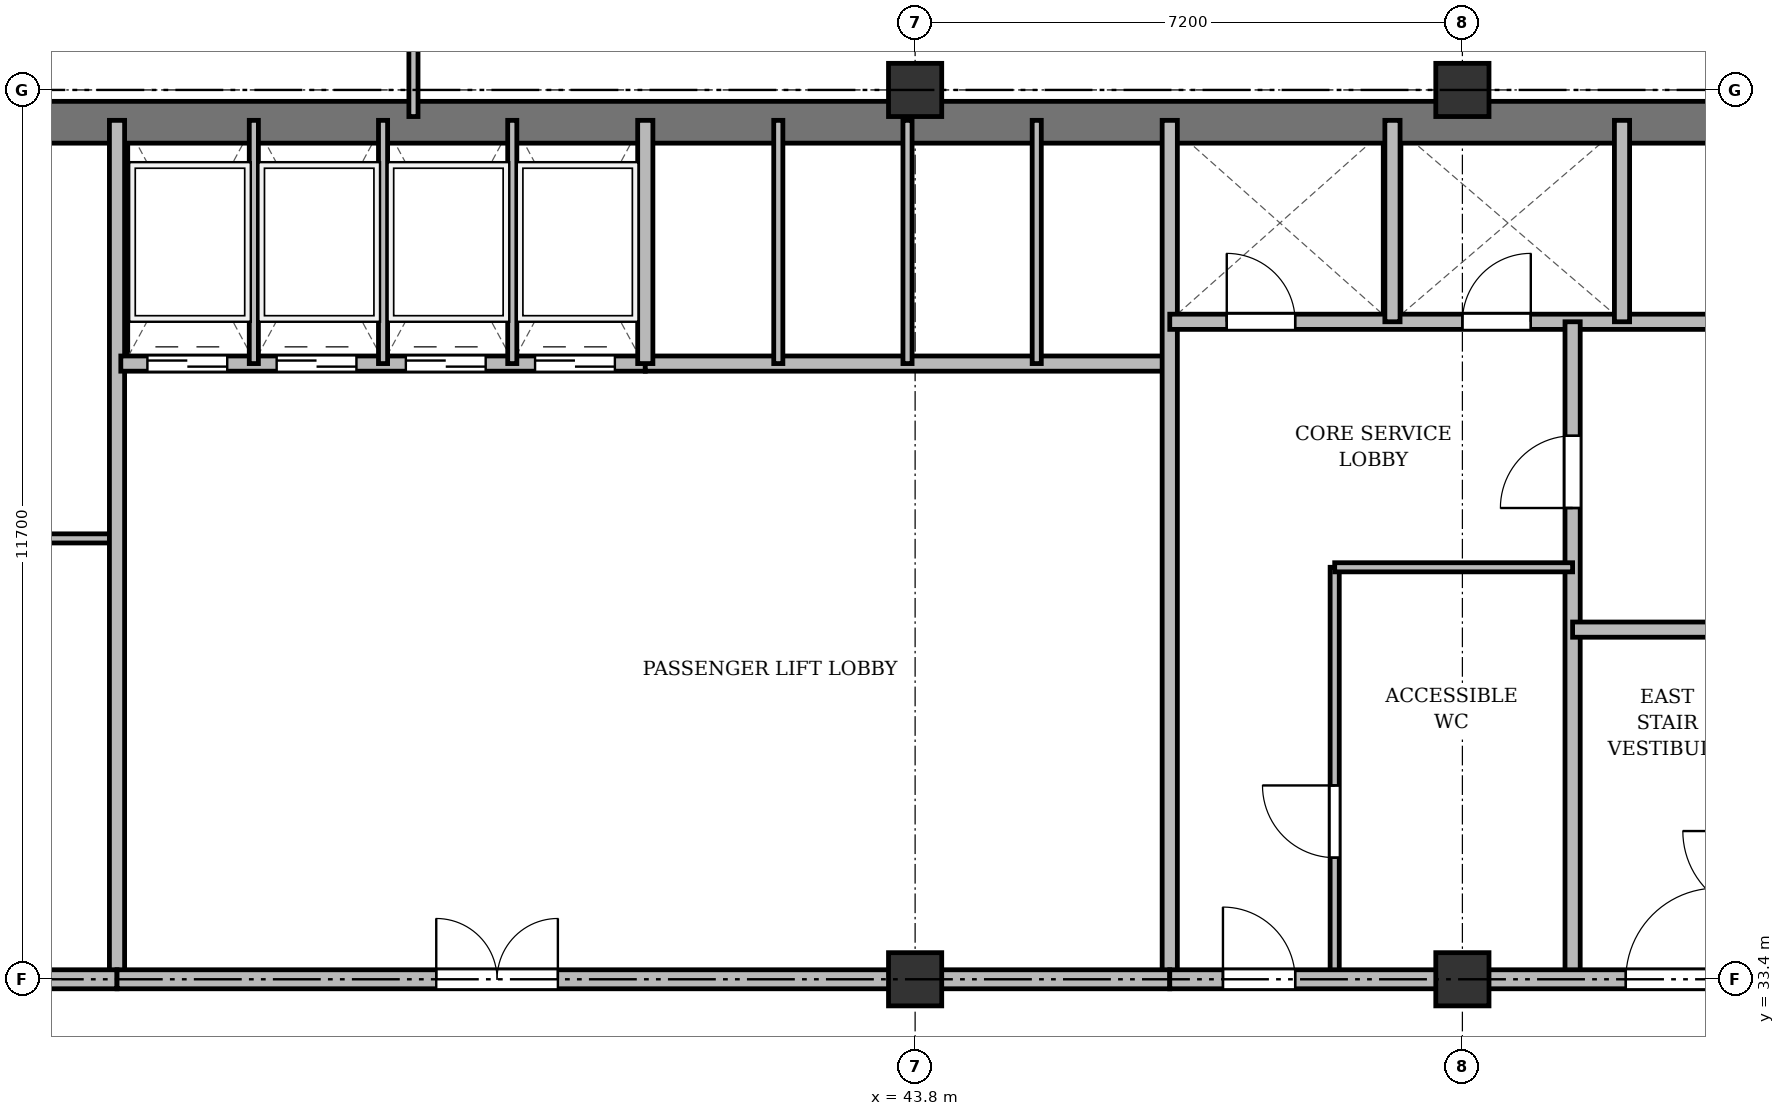
"""IFC4 building model, lengths in metres.
Left out: names, types, materials, properties, quantities, classifications, styles, units other than length and angle.
Written with IfcOpenShell. Run it as: python <this file> out.ifc"""

import sys

from ifc_helpers import new_model, si_unit, direction, frame, frame_2d, origin, origin_2d, place, context, subcontext, project, spatial, rectangle, extrude, source, transform, mapped, element, fill, save


model = new_model("IFC4")
c1 = context("Model", 3, precision=1e-05, world=origin(), true_north=direction((0.0, 1.0)))
c2 = subcontext(c1, "Body", "Model", "MODEL_VIEW")
j1 = project(units=[si_unit("LENGTHUNIT", "METRE"), si_unit("PLANEANGLEUNIT", "RADIAN")], contexts=[c1])
p1 = place(None, origin())
s1 = spatial("IfcSite", under=j1, at=p1, CompositionType="ELEMENT")
p2 = place(p1, origin())
s2 = spatial("IfcBuilding", under=s1, at=p2, CompositionType="ELEMENT")
p3 = place(p2, frame((0.0, 0.0, 150.1)))
s3 = spatial("IfcBuildingStorey", under=s2, at=p3, CompositionType="ELEMENT", Elevation=150.1)
m1 = source(origin(), c2, "Body", "SweptSolid", [
    extrude(rectangle(XDim=0.7, YDim=0.7, at=origin_2d()), origin(), (0.0, 0.0, 1.0), 3.6),
])
for number, where, z_axis, x_axis in (
    (1, (43.8, 33.4, 0.0), (0.0, 0.0, 1.0), (1.0, 0.0, 0.0)),
    (2, (43.8, 45.1, 0.0), (0.0, 0.0, 1.0), (1.0, 0.0, 0.0)),
    (3, (51.0, 33.4, 0.0), (0.0, 0.0, 1.0), (1.0, 0.0, 0.0)),
    (4, (51.0, 45.1, 0.0), (0.0, 0.0, 1.0), (1.0, 0.0, 0.0)),
):
    element("IfcColumn", number, at=place(p3, frame(where, z_axis=z_axis, x_axis=x_axis)), inside=s3, PredefinedType="COLUMN", context=c2, shape_type="MappedRepresentation", body=[
        mapped(m1, transform((0.0, 0.0, 0.0), x_axis=(1.0, 0.0, 0.0), y_axis=(0.0, 1.0, 0.0), z_axis=(0.0, 0.0, 1.0), scale=1.0)),
    ])
p4 = place(p3, frame((15.65, 44.675, 0.0), z_axis=(0.0, 0.0, 1.0), x_axis=(1.0, 0.0, 0.0)))
e5 = element("IfcWall", 5, at=p4, inside=s3, PredefinedType="SHEAR", context=c2, shape_type="SweptSolid", body=[
    extrude(rectangle(XDim=43.1, YDim=0.55, at=frame_2d((21.55, 0.0))), origin(), (0.0, 0.0, 1.0), 3.35),
])
p5 = place(p3, frame((26.3, 39.2, 0.0), z_axis=(0.0, 0.0, 1.0), x_axis=(1.0, 0.0, 0.0)))
e6 = element("IfcWall", 6, at=p5, inside=s3, PredefinedType="PARTITIONING", context=c2, shape_type="SweptSolid", body=[
    extrude(rectangle(XDim=7.0, YDim=0.12, at=frame_2d((3.5, 0.0))), origin(), (0.0, 0.0, 1.0), 2.85),
])
p6 = place(p5, frame((2.6, 0.0, 0.0)))
e7 = element("IfcOpeningElement", 7, at=p6, cuts=e6, PredefinedType="OPENING", context=c2, shape_type="SweptSolid", body=[
    extrude(rectangle(XDim=0.95, YDim=2.15, at=frame_2d((0.475, 1.075))), frame((0.0, 0.07, 0.0), z_axis=(0.0, -1.0, 0.0), x_axis=(1.0, 0.0, 0.0)), (0.0, 0.0, 1.0), 0.14),
])
p7 = place(p3, frame((33.3, 33.4, 0.0), z_axis=(0.0, 0.0, 1.0), x_axis=(0.0, 1.0, 0.0)))
e8 = element("IfcWall", 8, at=p7, inside=s3, PredefinedType="SOLIDWALL", context=c2, shape_type="SweptSolid", body=[
    extrude(rectangle(XDim=11.3, YDim=0.2, at=frame_2d((5.65, 0.0))), origin(), (0.0, 0.0, 1.0), 2.75),
])
p8 = place(p3, frame((33.35, 41.5, 0.0), z_axis=(0.0, 0.0, 1.0), x_axis=(1.0, 0.0, 0.0)))
e9 = element("IfcWall", 9, at=p8, inside=s3, PredefinedType="SOLIDWALL", context=c2, shape_type="SweptSolid", body=[
    extrude(rectangle(XDim=6.9, YDim=0.2, at=frame_2d((3.45, 0.0))), origin(), (0.0, 0.0, 1.0), 3.35),
])
p9 = place(p8, frame((0.35, 0.0, 0.0)))
e10 = element("IfcOpeningElement", 10, at=p9, cuts=e9, PredefinedType="OPENING", context=c2, shape_type="SweptSolid", body=[
    extrude(rectangle(XDim=1.05, YDim=2.15, at=frame_2d((0.525, 1.075))), frame((0.0, 0.11, 0.0), z_axis=(0.0, -1.0, 0.0), x_axis=(1.0, 0.0, 0.0)), (0.0, 0.0, 1.0), 0.22),
])
p10 = place(p8, frame((2.05, 0.0, 0.0)))
e11 = element("IfcOpeningElement", 11, at=p10, cuts=e9, PredefinedType="OPENING", context=c2, shape_type="SweptSolid", body=[
    extrude(rectangle(XDim=1.05, YDim=2.15, at=frame_2d((0.525, 1.075))), frame((0.0, 0.11, 0.0), z_axis=(0.0, -1.0, 0.0), x_axis=(1.0, 0.0, 0.0)), (0.0, 0.0, 1.0), 0.22),
])
p11 = place(p8, frame((3.75, 0.0, 0.0)))
e12 = element("IfcOpeningElement", 12, at=p11, cuts=e9, PredefinedType="OPENING", context=c2, shape_type="SweptSolid", body=[
    extrude(rectangle(XDim=1.05, YDim=2.15, at=frame_2d((0.525, 1.075))), frame((0.0, 0.11, 0.0), z_axis=(0.0, -1.0, 0.0), x_axis=(1.0, 0.0, 0.0)), (0.0, 0.0, 1.0), 0.22),
])
p12 = place(p8, frame((5.45, 0.0, 0.0)))
e13 = element("IfcOpeningElement", 13, at=p12, cuts=e9, PredefinedType="OPENING", context=c2, shape_type="SweptSolid", body=[
    extrude(rectangle(XDim=1.05, YDim=2.15, at=frame_2d((0.525, 1.075))), frame((0.0, 0.11, 0.0), z_axis=(0.0, -1.0, 0.0), x_axis=(1.0, 0.0, 0.0)), (0.0, 0.0, 1.0), 0.22),
])
for number, where, z_axis, x_axis in (
    (14, (35.1, 41.5, 0.0), (0.0, 0.0, 1.0), (0.0, 1.0, 0.0)),
    (15, (36.8, 41.5, 0.0), (0.0, 0.0, 1.0), (0.0, 1.0, 0.0)),
    (16, (38.5, 41.5, 0.0), (0.0, 0.0, 1.0), (0.0, 1.0, 0.0)),
):
    element("IfcWall", number, at=place(p3, frame(where, z_axis=z_axis, x_axis=x_axis)), inside=s3, PredefinedType="PARTITIONING", context=c2, shape_type="SweptSolid", body=[
        extrude(rectangle(XDim=3.2, YDim=0.12, at=frame_2d((1.6, 0.0))), origin(), (0.0, 0.0, 1.0), 3.35),
    ])
p13 = place(p3, frame((40.25, 41.5, 0.0), z_axis=(0.0, 0.0, 1.0), x_axis=(1.0, 0.0, 0.0)))
e17 = element("IfcWall", 17, at=p13, inside=s3, PredefinedType="SOLIDWALL", context=c2, shape_type="SweptSolid", body=[
    extrude(rectangle(XDim=6.9, YDim=0.2, at=frame_2d((3.45, 0.0))), origin(), (0.0, 0.0, 1.0), 2.85),
])
p14 = place(p3, frame((40.25, 41.5, 0.0), z_axis=(0.0, 0.0, 1.0), x_axis=(0.0, 1.0, 0.0)))
e18 = element("IfcWall", 18, at=p14, inside=s3, PredefinedType="SOLIDWALL", context=c2, shape_type="SweptSolid", body=[
    extrude(rectangle(XDim=3.2, YDim=0.2, at=frame_2d((1.6, 0.0))), origin(), (0.0, 0.0, 1.0), 3.35),
])
p15 = place(p3, frame((42.0, 41.5, 0.0), z_axis=(0.0, 0.0, 1.0), x_axis=(0.0, 1.0, 0.0)))
e19 = element("IfcWall", 19, at=p15, inside=s3, PredefinedType="PARTITIONING", context=c2, shape_type="SweptSolid", body=[
    extrude(rectangle(XDim=3.2, YDim=0.12, at=frame_2d((1.6, 0.0))), origin(), (0.0, 0.0, 1.0), 3.35),
])
p16 = place(p3, frame((43.7, 41.5, 0.0), z_axis=(0.0, 0.0, 1.0), x_axis=(0.0, 1.0, 0.0)))
e20 = element("IfcWall", 20, at=p16, inside=s3, PredefinedType="PARTITIONING", context=c2, shape_type="SweptSolid", body=[
    extrude(rectangle(XDim=3.2, YDim=0.12, at=frame_2d((1.6, 0.0))), origin(), (0.0, 0.0, 1.0), 2.85),
])
p17 = place(p3, frame((45.4, 41.5, 0.0), z_axis=(0.0, 0.0, 1.0), x_axis=(0.0, 1.0, 0.0)))
e21 = element("IfcWall", 21, at=p17, inside=s3, PredefinedType="PARTITIONING", context=c2, shape_type="SweptSolid", body=[
    extrude(rectangle(XDim=3.2, YDim=0.12, at=frame_2d((1.6, 0.0))), origin(), (0.0, 0.0, 1.0), 3.35),
])
p18 = place(p3, frame((47.15, 33.4, 0.0), z_axis=(0.0, 0.0, 1.0), x_axis=(0.0, 1.0, 0.0)))
e22 = element("IfcWall", 22, at=p18, inside=s3, PredefinedType="SOLIDWALL", context=c2, shape_type="SweptSolid", body=[
    extrude(rectangle(XDim=11.3, YDim=0.2, at=frame_2d((5.65, 0.0))), origin(), (0.0, 0.0, 1.0), 2.75),
])
p19 = place(p3, frame((26.3, 33.4, 0.0), z_axis=(0.0, 0.0, 1.0), x_axis=(1.0, 0.0, 0.0)))
e23 = element("IfcWall", 23, at=p19, inside=s3, PredefinedType="PARTITIONING", context=c2, shape_type="SweptSolid", body=[
    extrude(rectangle(XDim=7.0, YDim=0.25, at=frame_2d((3.5, 0.0))), origin(), (0.0, 0.0, 1.0), 2.75),
])
p20 = place(p19, frame((1.35, 0.0, 0.0)))
e24 = element("IfcOpeningElement", 24, at=p20, cuts=e23, PredefinedType="OPENING", context=c2, shape_type="SweptSolid", body=[
    extrude(rectangle(XDim=0.95, YDim=2.15, at=frame_2d((0.475, 1.075))), frame((0.0, 0.135, 0.0), z_axis=(0.0, -1.0, 0.0), x_axis=(1.0, 0.0, 0.0)), (0.0, 0.0, 1.0), 0.27),
])
p21 = place(p3, frame((33.3, 33.4, 0.0), z_axis=(0.0, 0.0, 1.0), x_axis=(1.0, 0.0, 0.0)))
e25 = element("IfcWall", 25, at=p21, inside=s3, PredefinedType="PARTITIONING", context=c2, shape_type="SweptSolid", body=[
    extrude(rectangle(XDim=13.85, YDim=0.25, at=frame_2d((6.925, 0.0))), origin(), (0.0, 0.0, 1.0), 2.75),
])
p22 = place(p21, frame((4.2, 0.0, 0.0)))
e26 = element("IfcOpeningElement", 26, at=p22, cuts=e25, PredefinedType="OPENING", context=c2, shape_type="SweptSolid", body=[
    extrude(rectangle(XDim=1.6, YDim=2.2, at=frame_2d((0.8, 1.1))), frame((0.0, 0.135, 0.0), z_axis=(0.0, -1.0, 0.0), x_axis=(1.0, 0.0, 0.0)), (0.0, 0.0, 1.0), 0.27),
])
p23 = place(p3, frame((47.15, 42.05, 0.0), z_axis=(0.0, 0.0, 1.0), x_axis=(1.0, 0.0, 0.0)))
e27 = element("IfcWall", 27, at=p23, inside=s3, PredefinedType="SOLIDWALL", context=c2, shape_type="SweptSolid", body=[
    extrude(rectangle(XDim=7.85, YDim=0.2, at=frame_2d((3.925, 0.0))), origin(), (0.0, 0.0, 1.0), 2.85),
])
p24 = place(p23, frame((0.75, 0.0, 0.0)))
e28 = element("IfcOpeningElement", 28, at=p24, cuts=e27, PredefinedType="OPENING", context=c2, shape_type="SweptSolid", body=[
    extrude(rectangle(XDim=0.9, YDim=2.1, at=frame_2d((0.45, 1.05))), frame((0.0, 0.11, 0.0), z_axis=(0.0, -1.0, 0.0), x_axis=(1.0, 0.0, 0.0)), (0.0, 0.0, 1.0), 0.22),
])
p25 = place(p23, frame((3.85, 0.0, 0.0)))
e29 = element("IfcOpeningElement", 29, at=p25, cuts=e27, PredefinedType="OPENING", context=c2, shape_type="SweptSolid", body=[
    extrude(rectangle(XDim=0.9, YDim=2.1, at=frame_2d((0.45, 1.05))), frame((0.0, 0.11, 0.0), z_axis=(0.0, -1.0, 0.0), x_axis=(1.0, 0.0, 0.0)), (0.0, 0.0, 1.0), 0.22),
])
for number, where, z_axis, x_axis in (
    (30, (50.08, 42.05, 0.0), (0.0, 0.0, 1.0), (0.0, 1.0, 0.0)),
    (31, (53.1, 42.05, 0.0), (0.0, 0.0, 1.0), (0.0, 1.0, 0.0)),
):
    element("IfcWall", number, at=place(p3, frame(where, z_axis=z_axis, x_axis=x_axis)), inside=s3, PredefinedType="SOLIDWALL", context=c2, shape_type="SweptSolid", body=[
        extrude(rectangle(XDim=2.65, YDim=0.2, at=frame_2d((1.325, 0.0))), origin(), (0.0, 0.0, 1.0), 3.35),
    ])
p26 = place(p3, frame((52.45, 33.4, 0.0), z_axis=(0.0, 0.0, 1.0), x_axis=(0.0, 1.0, 0.0)))
e32 = element("IfcWall", 32, at=p26, inside=s3, PredefinedType="PARTITIONING", context=c2, shape_type="SweptSolid", body=[
    extrude(rectangle(XDim=8.65, YDim=0.2, at=frame_2d((4.325, 0.0))), origin(), (0.0, 0.0, 1.0), 2.75),
])
p27 = place(p26, frame((6.2, 0.0, 0.0)))
e33 = element("IfcOpeningElement", 33, at=p27, cuts=e32, PredefinedType="OPENING", context=c2, shape_type="SweptSolid", body=[
    extrude(rectangle(XDim=0.95, YDim=2.15, at=frame_2d((0.475, 1.075))), frame((0.0, 0.11, 0.0), z_axis=(0.0, -1.0, 0.0), x_axis=(1.0, 0.0, 0.0)), (0.0, 0.0, 1.0), 0.22),
])
p28 = place(p3, frame((52.45, 38.0, 0.0), z_axis=(0.0, 0.0, 1.0), x_axis=(1.0, 0.0, 0.0)))
e34 = element("IfcWall", 34, at=p28, inside=s3, PredefinedType="PARTITIONING", context=c2, shape_type="SweptSolid", body=[
    extrude(rectangle(XDim=2.55, YDim=0.2, at=frame_2d((1.275, 0.0))), origin(), (0.0, 0.0, 1.0), 3.35),
])
p29 = place(p3, frame((49.32, 33.4, 0.0), z_axis=(0.0, 0.0, 1.0), x_axis=(0.0, 1.0, 0.0)))
e35 = element("IfcWall", 35, at=p29, inside=s3, PredefinedType="PARTITIONING", context=c2, shape_type="SweptSolid", body=[
    extrude(rectangle(XDim=5.42, YDim=0.12, at=frame_2d((2.71, 0.0))), origin(), (0.0, 0.0, 1.0), 2.75),
])
p30 = place(p29, frame((1.6, 0.0, 0.0)))
e36 = element("IfcOpeningElement", 36, at=p30, cuts=e35, PredefinedType="OPENING", context=c2, shape_type="SweptSolid", body=[
    extrude(rectangle(XDim=0.95, YDim=2.15, at=frame_2d((0.475, 1.075))), frame((0.0, 0.07, 0.0), z_axis=(0.0, -1.0, 0.0), x_axis=(1.0, 0.0, 0.0)), (0.0, 0.0, 1.0), 0.14),
])
p31 = place(p3, frame((49.32, 38.82, 0.0), z_axis=(0.0, 0.0, 1.0), x_axis=(1.0, 0.0, 0.0)))
e37 = element("IfcWall", 37, at=p31, inside=s3, PredefinedType="PARTITIONING", context=c2, shape_type="SweptSolid", body=[
    extrude(rectangle(XDim=3.13, YDim=0.12, at=frame_2d((1.565, 0.0))), origin(), (0.0, 0.0, 1.0), 2.85),
])
p32 = place(p3, frame((47.15, 33.4, 0.0), z_axis=(0.0, 0.0, 1.0), x_axis=(1.0, 0.0, 0.0)))
e38 = element("IfcWall", 38, at=p32, inside=s3, PredefinedType="PARTITIONING", context=c2, shape_type="SweptSolid", body=[
    extrude(rectangle(XDim=11.15, YDim=0.25, at=frame_2d((5.575, 0.0))), origin(), (0.0, 0.0, 1.0), 2.75),
])
p33 = place(p32, frame((0.7, 0.0, 0.0)))
e39 = element("IfcOpeningElement", 39, at=p33, cuts=e38, PredefinedType="OPENING", context=c2, shape_type="SweptSolid", body=[
    extrude(rectangle(XDim=0.95, YDim=2.15, at=frame_2d((0.475, 1.075))), frame((0.0, 0.135, 0.0), z_axis=(0.0, -1.0, 0.0), x_axis=(1.0, 0.0, 0.0)), (0.0, 0.0, 1.0), 0.27),
])
p34 = place(p32, frame((6.0, 0.0, 0.0)))
e40 = element("IfcOpeningElement", 40, at=p34, cuts=e38, PredefinedType="OPENING", context=c2, shape_type="SweptSolid", body=[
    extrude(rectangle(XDim=1.2, YDim=2.15, at=frame_2d((0.6, 1.075))), frame((0.0, 0.135, 0.0), z_axis=(0.0, -1.0, 0.0), x_axis=(1.0, 0.0, 0.0)), (0.0, 0.0, 1.0), 0.27),
])
p35 = place(p3, frame((37.2, 44.75, 0.0), z_axis=(0.0, 0.0, 1.0), x_axis=(0.0, 1.0, 0.0)))
e41 = element("IfcWall", 41, at=p35, inside=s3, PredefinedType="PARTITIONING", context=c2, shape_type="SweptSolid", body=[
    extrude(rectangle(XDim=3.61, YDim=0.12, at=frame_2d((1.805, 0.0))), origin(), (0.0, 0.0, 1.0), 2.75),
])
p36 = place(p35, frame((1.1, 0.0, 0.0)))
e42 = element("IfcOpeningElement", 42, at=p36, cuts=e41, PredefinedType="OPENING", context=c2, shape_type="SweptSolid", body=[
    extrude(rectangle(XDim=0.95, YDim=2.15, at=frame_2d((0.475, 1.075))), frame((0.0, 0.07, 0.0), z_axis=(0.0, -1.0, 0.0), x_axis=(1.0, 0.0, 0.0)), (0.0, 0.0, 1.0), 0.14),
])
m2 = source(origin(), c2, "Body", "SweptSolid", [
    extrude(rectangle(XDim=1.05, YDim=2.15, at=frame_2d((0.525, 1.075))), frame((0.0, 0.025, 0.0), z_axis=(0.0, -1.0, 0.0), x_axis=(1.0, 0.0, 0.0)), (0.0, 0.0, 1.0), 0.05),
])
p37 = place(p9, origin())
e43 = element("IfcDoor", 43, at=p37, inside=s3, OperationType="DOUBLE_DOOR_SLIDING", PredefinedType="DOOR", context=c2, shape_type="MappedRepresentation", body=[
    mapped(m2, transform((0.0, 0.0, 0.0), x_axis=(1.0, 0.0, 0.0), y_axis=(0.0, 1.0, 0.0), z_axis=(0.0, 0.0, 1.0), scale=1.0)),
])
fill(e10, e43)
p38 = place(p10, origin())
e44 = element("IfcDoor", 44, at=p38, inside=s3, OperationType="DOUBLE_DOOR_SLIDING", PredefinedType="DOOR", context=c2, shape_type="MappedRepresentation", body=[
    mapped(m2, transform((0.0, 0.0, 0.0), x_axis=(1.0, 0.0, 0.0), y_axis=(0.0, 1.0, 0.0), z_axis=(0.0, 0.0, 1.0), scale=1.0)),
])
fill(e11, e44)
p39 = place(p11, origin())
e45 = element("IfcDoor", 45, at=p39, inside=s3, OperationType="DOUBLE_DOOR_SLIDING", PredefinedType="DOOR", context=c2, shape_type="MappedRepresentation", body=[
    mapped(m2, transform((0.0, 0.0, 0.0), x_axis=(1.0, 0.0, 0.0), y_axis=(0.0, 1.0, 0.0), z_axis=(0.0, 0.0, 1.0), scale=1.0)),
])
fill(e12, e45)
p40 = place(p12, origin())
e46 = element("IfcDoor", 46, at=p40, inside=s3, OperationType="DOUBLE_DOOR_SLIDING", PredefinedType="DOOR", context=c2, shape_type="MappedRepresentation", body=[
    mapped(m2, transform((0.0, 0.0, 0.0), x_axis=(1.0, 0.0, 0.0), y_axis=(0.0, 1.0, 0.0), z_axis=(0.0, 0.0, 1.0), scale=1.0)),
])
fill(e13, e46)
m3 = source(origin(), c2, "Body", "SweptSolid", [
    extrude(rectangle(XDim=1.6, YDim=2.2, at=frame_2d((0.8, 1.1))), frame((0.0, 0.025, 0.0), z_axis=(0.0, -1.0, 0.0), x_axis=(1.0, 0.0, 0.0)), (0.0, 0.0, 1.0), 0.05),
])
p41 = place(p22, origin())
e47 = element("IfcDoor", 47, at=p41, inside=s3, OperationType="DOUBLE_DOOR_SINGLE_SWING", PredefinedType="DOOR", context=c2, shape_type="MappedRepresentation", body=[
    mapped(m3, transform((0.0, 0.0, 0.0), x_axis=(1.0, 0.0, 0.0), y_axis=(0.0, 1.0, 0.0), z_axis=(0.0, 0.0, 1.0), scale=1.0)),
])
fill(e26, e47)
m4 = source(origin(), c2, "Body", "SweptSolid", [
    extrude(rectangle(XDim=0.9, YDim=2.1, at=frame_2d((0.45, 1.05))), frame((0.0, 0.025, 0.0), z_axis=(0.0, -1.0, 0.0), x_axis=(1.0, 0.0, 0.0)), (0.0, 0.0, 1.0), 0.05),
])
p42 = place(p24, origin())
e48 = element("IfcDoor", 48, at=p42, inside=s3, OperationType="SINGLE_SWING_LEFT", PredefinedType="DOOR", context=c2, shape_type="MappedRepresentation", body=[
    mapped(m4, transform((0.0, 0.0, 0.0), x_axis=(1.0, 0.0, 0.0), y_axis=(0.0, 1.0, 0.0), z_axis=(0.0, 0.0, 1.0), scale=1.0)),
])
fill(e28, e48)
p43 = place(p25, origin())
e49 = element("IfcDoor", 49, at=p43, inside=s3, OperationType="SINGLE_SWING_RIGHT", PredefinedType="DOOR", context=c2, shape_type="MappedRepresentation", body=[
    mapped(m4, transform((0.0, 0.0, 0.0), x_axis=(1.0, 0.0, 0.0), y_axis=(0.0, 1.0, 0.0), z_axis=(0.0, 0.0, 1.0), scale=1.0)),
])
fill(e29, e49)
m5 = source(origin(), c2, "Body", "SweptSolid", [
    extrude(rectangle(XDim=0.95, YDim=2.15, at=frame_2d((0.475, 1.075))), frame((0.0, 0.025, 0.0), z_axis=(0.0, -1.0, 0.0), x_axis=(1.0, 0.0, 0.0)), (0.0, 0.0, 1.0), 0.05),
])
p44 = place(p27, origin())
e50 = element("IfcDoor", 50, at=p44, inside=s3, OperationType="SINGLE_SWING_LEFT", PredefinedType="DOOR", context=c2, shape_type="MappedRepresentation", body=[
    mapped(m5, transform((0.0, 0.0, 0.0), x_axis=(1.0, 0.0, 0.0), y_axis=(0.0, 1.0, 0.0), z_axis=(0.0, 0.0, 1.0), scale=1.0)),
])
fill(e33, e50)
p45 = place(p30, origin())
e51 = element("IfcDoor", 51, at=p45, inside=s3, OperationType="SINGLE_SWING_RIGHT", PredefinedType="DOOR", context=c2, shape_type="MappedRepresentation", body=[
    mapped(m5, transform((0.0, 0.0, 0.0), x_axis=(1.0, 0.0, 0.0), y_axis=(0.0, 1.0, 0.0), z_axis=(0.0, 0.0, 1.0), scale=1.0)),
])
fill(e36, e51)
p46 = place(p33, origin())
e52 = element("IfcDoor", 52, at=p46, inside=s3, OperationType="SINGLE_SWING_LEFT", PredefinedType="DOOR", context=c2, shape_type="MappedRepresentation", body=[
    mapped(m5, transform((0.0, 0.0, 0.0), x_axis=(1.0, 0.0, 0.0), y_axis=(0.0, 1.0, 0.0), z_axis=(0.0, 0.0, 1.0), scale=1.0)),
])
fill(e39, e52)
m6 = source(origin(), c2, "Body", "SweptSolid", [
    extrude(rectangle(XDim=1.2, YDim=2.15, at=frame_2d((0.6, 1.075))), frame((0.0, 0.025, 0.0), z_axis=(0.0, -1.0, 0.0), x_axis=(1.0, 0.0, 0.0)), (0.0, 0.0, 1.0), 0.05),
])
p47 = place(p34, origin())
e53 = element("IfcDoor", 53, at=p47, inside=s3, OperationType="SINGLE_SWING_RIGHT", PredefinedType="DOOR", context=c2, shape_type="MappedRepresentation", body=[
    mapped(m6, transform((0.0, 0.0, 0.0), x_axis=(1.0, 0.0, 0.0), y_axis=(0.0, 1.0, 0.0), z_axis=(0.0, 0.0, 1.0), scale=1.0)),
])
fill(e40, e53)
save(model, sys.argv[1])
